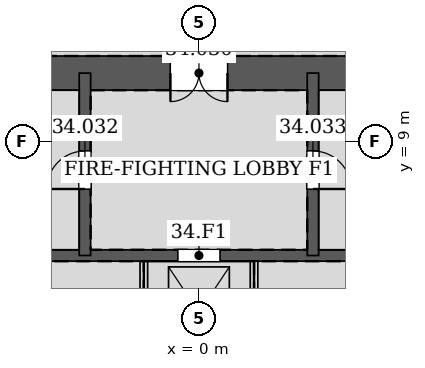
"""IFC4 building model, lengths in metres.
Left out: names, types, materials, properties, quantities, classifications, styles, units other than length and angle.
Written with IfcOpenShell. Run it as: python <this file> out.ifc"""

import sys

from ifc_helpers import new_model, si_unit, direction, frame, frame_2d, origin, place, context, subcontext, project, spatial, rectangle, extrude, element, fill, save


model = new_model("IFC4")
c1 = context("Model", 3, precision=1e-05, world=origin(), true_north=direction((0.0, 1.0)))
c2 = subcontext(c1, "Body", "Model", "MODEL_VIEW")
j1 = project(units=[si_unit("LENGTHUNIT", "METRE"), si_unit("PLANEANGLEUNIT", "RADIAN")], contexts=[c1])
p1 = place(None, origin())
s1 = spatial("IfcSite", under=j1, at=p1, CompositionType="ELEMENT")
p2 = place(p1, origin())
s2 = spatial("IfcBuilding", under=s1, at=p2, CompositionType="ELEMENT")
p3 = place(p2, frame((0.0, 0.0, 151.2)))
s3 = spatial("IfcBuildingStorey", under=s2, at=p3, CompositionType="ELEMENT", Elevation=151.2)
p4 = place(p3, frame((10.8, 10.8, 0.0), z_axis=(0.0, 0.0, 1.0), x_axis=(-1.0, 0.0, 0.0)))
e1 = element("IfcWall", 1, at=p4, inside=s3, PredefinedType="SOLIDWALL", context=c2, shape_type="SweptSolid", body=[
    extrude(rectangle(XDim=21.6, YDim=0.9, at=frame_2d((10.8, 0.0))), origin(), (0.0, 0.0, 1.0), 4.2),
])
p5 = place(p4, frame((10.05, 0.0, 0.0)))
e2 = element("IfcOpeningElement", 2, at=p5, cuts=e1, PredefinedType="OPENING", context=c2, shape_type="SweptSolid", body=[
    extrude(rectangle(XDim=1.5, YDim=2.1, at=frame_2d((0.75, 1.05))), frame((0.0, 0.46, 0.0), z_axis=(0.0, -1.0, 0.0), x_axis=(1.0, 0.0, 0.0)), (0.0, 0.0, 1.0), 0.92),
])
p6 = place(p3, frame((-10.8, 6.0, 0.0), z_axis=(0.0, 0.0, 1.0), x_axis=(1.0, 0.0, 0.0)))
e3 = element("IfcWall", 3, at=p6, inside=s3, PredefinedType="SOLIDWALL", context=c2, shape_type="SweptSolid", body=[
    extrude(rectangle(XDim=21.6, YDim=0.3, at=frame_2d((10.8, 0.0))), origin(), (0.0, 0.0, 1.0), 4.2),
])
p7 = place(p6, frame((10.25, 0.0, 0.0)))
e4 = element("IfcOpeningElement", 4, at=p7, cuts=e3, PredefinedType="OPENING", context=c2, shape_type="SweptSolid", body=[
    extrude(rectangle(XDim=1.1, YDim=2.1, at=frame_2d((0.55, 1.05))), frame((0.0, 0.16, 0.0), z_axis=(0.0, -1.0, 0.0), x_axis=(1.0, 0.0, 0.0)), (0.0, 0.0, 1.0), 0.32),
])
p8 = place(p3, frame((-3.0, 6.0, 0.0), z_axis=(0.0, 0.0, 1.0), x_axis=(0.0, 1.0, 0.0)))
e5 = element("IfcWall", 5, at=p8, inside=s3, PredefinedType="SOLIDWALL", context=c2, shape_type="SweptSolid", body=[
    extrude(rectangle(XDim=4.8, YDim=0.3, at=frame_2d((2.4, 0.0))), origin(), (0.0, 0.0, 1.0), 4.2),
])
p9 = place(p8, frame((1.75, 0.0, 0.0)))
e6 = element("IfcOpeningElement", 6, at=p9, cuts=e5, PredefinedType="OPENING", context=c2, shape_type="SweptSolid", body=[
    extrude(rectangle(XDim=1.0, YDim=2.1, at=frame_2d((0.5, 1.05))), frame((0.0, 0.16, 0.0), z_axis=(0.0, -1.0, 0.0), x_axis=(1.0, 0.0, 0.0)), (0.0, 0.0, 1.0), 0.32),
])
p10 = place(p3, frame((3.0, 6.0, 0.0), z_axis=(0.0, 0.0, 1.0), x_axis=(0.0, 1.0, 0.0)))
e7 = element("IfcWall", 7, at=p10, inside=s3, PredefinedType="SOLIDWALL", context=c2, shape_type="SweptSolid", body=[
    extrude(rectangle(XDim=4.8, YDim=0.3, at=frame_2d((2.4, 0.0))), origin(), (0.0, 0.0, 1.0), 4.2),
])
p11 = place(p10, frame((1.75, 0.0, 0.0)))
e8 = element("IfcOpeningElement", 8, at=p11, cuts=e7, PredefinedType="OPENING", context=c2, shape_type="SweptSolid", body=[
    extrude(rectangle(XDim=1.0, YDim=2.1, at=frame_2d((0.5, 1.05))), frame((0.0, 0.16, 0.0), z_axis=(0.0, -1.0, 0.0), x_axis=(1.0, 0.0, 0.0)), (0.0, 0.0, 1.0), 0.32),
])
for number, where, z_axis, x_axis in (
    (9, (-1.45, 3.15, 0.0), (0.0, 0.0, 1.0), (0.0, 1.0, 0.0)),
    (10, (1.45, 3.15, 0.0), (0.0, 0.0, 1.0), (0.0, 1.0, 0.0)),
):
    element("IfcWall", number, at=place(p3, frame(where, z_axis=z_axis, x_axis=x_axis)), inside=s3, PredefinedType="PARTITIONING", context=c2, shape_type="SweptSolid", body=[
        extrude(rectangle(XDim=2.7, YDim=0.2, at=frame_2d((1.35, 0.0))), origin(), (0.0, 0.0, 1.0), 4.035),
    ])
p12 = place(p5, origin())
e11 = element("IfcDoor", 11, at=p12, inside=s3, OperationType="DOUBLE_DOOR_SINGLE_SWING", PredefinedType="DOOR", context=c2, shape_type="SweptSolid", body=[
    extrude(rectangle(XDim=1.5, YDim=2.1, at=frame_2d((0.75, 1.05))), frame((0.0, 0.025, 0.0), z_axis=(0.0, -1.0, 0.0), x_axis=(1.0, 0.0, 0.0)), (0.0, 0.0, 1.0), 0.05),
])
fill(e2, e11)
p13 = place(p9, origin())
e12 = element("IfcDoor", 12, at=p13, inside=s3, OperationType="SINGLE_SWING_LEFT", PredefinedType="DOOR", context=c2, shape_type="SweptSolid", body=[
    extrude(rectangle(XDim=1.0, YDim=2.1, at=frame_2d((0.5, 1.05))), frame((0.0, 0.025, 0.0), z_axis=(0.0, -1.0, 0.0), x_axis=(1.0, 0.0, 0.0)), (0.0, 0.0, 1.0), 0.05),
])
fill(e6, e12)
p14 = place(p11, frame((1.0, 0.0, 0.0), z_axis=(0.0, 0.0, 1.0), x_axis=(-1.0, 0.0, 0.0)))
e13 = element("IfcDoor", 13, at=p14, inside=s3, OperationType="SINGLE_SWING_RIGHT", PredefinedType="DOOR", context=c2, shape_type="SweptSolid", body=[
    extrude(rectangle(XDim=1.0, YDim=2.1, at=frame_2d((0.5, 1.05))), frame((0.0, 0.025, 0.0), z_axis=(0.0, -1.0, 0.0), x_axis=(1.0, 0.0, 0.0)), (0.0, 0.0, 1.0), 0.05),
])
fill(e8, e13)
p15 = place(p7, origin())
e14 = element("IfcDoor", 14, at=p15, inside=s3, OperationType="DOUBLE_DOOR_SLIDING", PredefinedType="DOOR", context=c2, shape_type="SweptSolid", body=[
    extrude(rectangle(XDim=1.1, YDim=2.1, at=frame_2d((0.55, 1.05))), frame((0.0, 0.025, 0.0), z_axis=(0.0, -1.0, 0.0), x_axis=(1.0, 0.0, 0.0)), (0.0, 0.0, 1.0), 0.05),
])
fill(e4, e14)
save(model, sys.argv[1])
